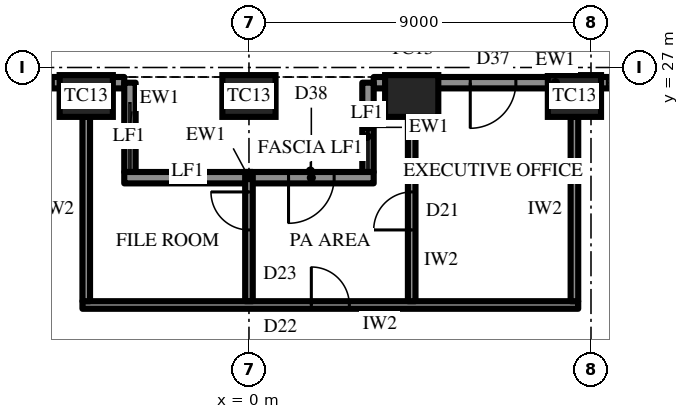
"""IFC4 building model, lengths in metres.
Left out: names, types, materials, properties, quantities, classifications, styles, units other than length and angle.
Written with IfcOpenShell. Run it as: python <this file> out.ifc"""

import sys

from ifc_helpers import new_model, si_unit, direction, frame, frame_2d, origin, origin_2d, place, context, subcontext, project, spatial, rectangle, extrude, element, fill, save


model = new_model("IFC4")
c1 = context("Model", 3, precision=1e-05, world=origin(), true_north=direction((0.0, 1.0)))
c2 = subcontext(c1, "Body", "Model", "MODEL_VIEW")
j1 = project(units=[si_unit("LENGTHUNIT", "METRE"), si_unit("PLANEANGLEUNIT", "RADIAN")], contexts=[c1])
p1 = place(None, origin())
s1 = spatial("IfcSite", under=j1, at=p1, CompositionType="ELEMENT")
p2 = place(p1, origin())
s2 = spatial("IfcBuilding", under=s1, at=p2, CompositionType="ELEMENT")
p3 = place(p2, frame((0.0, 0.0, 328.3)))
s3 = spatial("IfcBuildingStorey", under=s2, at=p3, CompositionType="ELEMENT", Elevation=328.3)
for number, where, z_axis, x_axis in (
    (1, (8.564, 26.25, 0.0), (0.0, 0.0, 1.0), (-1.0, 0.0, 0.0)),
    (2, (4.282, 26.25, 0.0), (0.0, 0.0, 1.0), (-1.0, 0.0, 0.0)),
    (3, (0.0, 26.25, 0.0), (0.0, 0.0, 1.0), (-1.0, 0.0, 0.0)),
    (4, (-4.282, 26.25, 0.0), (0.0, 0.0, 1.0), (-1.0, 0.0, 0.0)),
):
    element("IfcColumn", number, at=place(p3, frame(where, z_axis=z_axis, x_axis=x_axis)), inside=s3, PredefinedType="COLUMN", context=c2, shape_type="SweptSolid", body=[
        extrude(rectangle(XDim=1.4, YDim=1.1, at=origin_2d()), origin(), (0.0, 0.0, 1.0), 4.2),
    ])
p4 = place(p3, frame((12.846, 26.6, 0.0), z_axis=(0.0, 0.0, 1.0), x_axis=(-1.0, 0.0, 0.0)))
e5 = element("IfcWall", 5, at=p4, inside=s3, PredefinedType="SOLIDWALL", context=c2, shape_type="SweptSolid", body=[
    extrude(rectangle(XDim=9.564, YDim=0.3, at=frame_2d((4.782, 0.0))), origin(), (0.0, 0.0, 1.0), 2.9),
])
p5 = place(p4, frame((0.866, 0.0, 0.6)))
e6 = element("IfcOpeningElement", 6, at=p5, cuts=e5, PredefinedType="OPENING", context=c2, shape_type="SweptSolid", body=[
    extrude(rectangle(XDim=2.55, YDim=2.05, at=frame_2d((1.275, 1.025))), frame((0.0, 0.16, 0.0), z_axis=(0.0, -1.0, 0.0), x_axis=(1.0, 0.0, 0.0)), (0.0, 0.0, 1.0), 0.32),
])
p6 = place(p4, frame((5.823, 0.0, 0.0)))
e7 = element("IfcOpeningElement", 7, at=p6, cuts=e5, PredefinedType="OPENING", context=c2, shape_type="SweptSolid", body=[
    extrude(rectangle(XDim=1.2, YDim=2.4, at=frame_2d((0.6, 1.2))), frame((0.0, 0.16, 0.0), z_axis=(0.0, -1.0, 0.0), x_axis=(1.0, 0.0, 0.0)), (0.0, 0.0, 1.0), 0.32),
])
p7 = place(p3, frame((-3.282, 26.6, 0.0), z_axis=(0.0, 0.0, 1.0), x_axis=(-1.0, 0.0, 0.0)))
e8 = element("IfcWall", 8, at=p7, inside=s3, PredefinedType="SOLIDWALL", context=c2, shape_type="SweptSolid", body=[
    extrude(rectangle(XDim=9.564, YDim=0.3, at=frame_2d((4.782, 0.0))), origin(), (0.0, 0.0, 1.0), 2.9),
])
p8 = place(p7, frame((1.866, 0.0, 0.6)))
e9 = element("IfcOpeningElement", 9, at=p8, cuts=e8, PredefinedType="OPENING", context=c2, shape_type="SweptSolid", body=[
    extrude(rectangle(XDim=2.55, YDim=2.05, at=frame_2d((1.275, 1.025))), frame((0.0, 0.16, 0.0), z_axis=(0.0, -1.0, 0.0), x_axis=(1.0, 0.0, 0.0)), (0.0, 0.0, 1.0), 0.32),
])
p9 = place(p7, frame((6.148, 0.0, 0.6)))
e10 = element("IfcOpeningElement", 10, at=p9, cuts=e8, PredefinedType="OPENING", context=c2, shape_type="SweptSolid", body=[
    extrude(rectangle(XDim=2.55, YDim=2.05, at=frame_2d((1.275, 1.025))), frame((0.0, 0.16, 0.0), z_axis=(0.0, -1.0, 0.0), x_axis=(1.0, 0.0, 0.0)), (0.0, 0.0, 1.0), 0.32),
])
for number, where, z_axis, x_axis in (
    (11, (3.132, 26.6, 0.0), (0.0, 0.0, 1.0), (0.0, -1.0, 0.0)),
    (12, (-3.132, 26.6, 0.0), (0.0, 0.0, 1.0), (0.0, -1.0, 0.0)),
):
    element("IfcWall", number, at=place(p3, frame(where, z_axis=z_axis, x_axis=x_axis)), inside=s3, PredefinedType="SOLIDWALL", context=c2, shape_type="SweptSolid", body=[
        extrude(rectangle(XDim=2.35, YDim=0.3, at=frame_2d((1.175, 0.0))), origin(), (0.0, 0.0, 1.0), 2.9),
    ])
p10 = place(p3, frame((3.282, 24.1, 0.0), z_axis=(0.0, 0.0, 1.0), x_axis=(-1.0, 0.0, 0.0)))
e13 = element("IfcWall", 13, at=p10, inside=s3, PredefinedType="SOLIDWALL", context=c2, shape_type="SweptSolid", body=[
    extrude(rectangle(XDim=6.564, YDim=0.3, at=frame_2d((3.282, 0.0))), origin(), (0.0, 0.0, 1.0), 2.9),
])
p11 = place(p10, frame((1.041, 0.0, 0.0)))
e14 = element("IfcOpeningElement", 14, at=p11, cuts=e13, PredefinedType="OPENING", context=c2, shape_type="SweptSolid", body=[
    extrude(rectangle(XDim=1.2, YDim=2.4, at=frame_2d((0.6, 1.2))), frame((0.0, 0.16, 0.0), z_axis=(0.0, -1.0, 0.0), x_axis=(1.0, 0.0, 0.0)), (0.0, 0.0, 1.0), 0.32),
])
p12 = place(p3, frame((8.664, 20.75, 0.0), z_axis=(0.0, 0.0, 1.0), x_axis=(-1.0, 0.0, 0.0)))
e15 = element("IfcWall", 15, at=p12, inside=s3, PredefinedType="PARTITIONING", context=c2, shape_type="SweptSolid", body=[
    extrude(rectangle(XDim=13.046, YDim=0.2, at=frame_2d((6.523, 0.0))), origin(), (0.0, 0.0, 1.0), 4.0),
])
p13 = place(p12, frame((6.023, 0.0, 0.0)))
e16 = element("IfcOpeningElement", 16, at=p13, cuts=e15, PredefinedType="OPENING", context=c2, shape_type="SweptSolid", body=[
    extrude(rectangle(XDim=1.0, YDim=2.2, at=frame_2d((0.5, 1.1))), frame((0.0, 0.11, 0.0), z_axis=(0.0, -1.0, 0.0), x_axis=(1.0, 0.0, 0.0)), (0.0, 0.0, 1.0), 0.22),
])
p14 = place(p3, frame((8.564, 20.85, 0.0), z_axis=(0.0, 0.0, 1.0), x_axis=(0.0, 1.0, 0.0)))
e17 = element("IfcWall", 17, at=p14, inside=s3, PredefinedType="PARTITIONING", context=c2, shape_type="SweptSolid", body=[
    extrude(rectangle(XDim=4.85, YDim=0.2, at=frame_2d((2.425, 0.0))), origin(), (0.0, 0.0, 1.0), 2.992),
])
p15 = place(p3, frame((4.282, 20.85, 0.0), z_axis=(0.0, 0.0, 1.0), x_axis=(0.0, 1.0, 0.0)))
e18 = element("IfcWall", 18, at=p15, inside=s3, PredefinedType="PARTITIONING", context=c2, shape_type="SweptSolid", body=[
    extrude(rectangle(XDim=4.85, YDim=0.2, at=frame_2d((2.425, 0.0))), origin(), (0.0, 0.0, 1.0), 2.992),
])
p16 = place(p15, frame((1.875, 0.0, 0.0)))
e19 = element("IfcOpeningElement", 19, at=p16, cuts=e18, PredefinedType="OPENING", context=c2, shape_type="SweptSolid", body=[
    extrude(rectangle(XDim=1.0, YDim=2.2, at=frame_2d((0.5, 1.1))), frame((0.0, 0.11, 0.0), z_axis=(0.0, -1.0, 0.0), x_axis=(1.0, 0.0, 0.0)), (0.0, 0.0, 1.0), 0.22),
])
p17 = place(p3, frame((0.0, 20.85, 0.0), z_axis=(0.0, 0.0, 1.0), x_axis=(0.0, 1.0, 0.0)))
e20 = element("IfcWall", 20, at=p17, inside=s3, PredefinedType="PARTITIONING", context=c2, shape_type="SweptSolid", body=[
    extrude(rectangle(XDim=3.401, YDim=0.2, at=frame_2d((1.7, 0.0))), origin(), (0.0, 0.0, 1.0), 2.992),
])
p18 = place(p17, frame((1.875, 0.0, 0.0)))
e21 = element("IfcOpeningElement", 21, at=p18, cuts=e20, PredefinedType="OPENING", context=c2, shape_type="SweptSolid", body=[
    extrude(rectangle(XDim=1.0, YDim=2.2, at=frame_2d((0.5, 1.1))), frame((0.0, 0.11, 0.0), z_axis=(0.0, -1.0, 0.0), x_axis=(1.0, 0.0, 0.0)), (0.0, 0.0, 1.0), 0.22),
])
p19 = place(p3, frame((-4.282, 20.85, 0.0), z_axis=(0.0, 0.0, 1.0), x_axis=(0.0, 1.0, 0.0)))
e22 = element("IfcWall", 22, at=p19, inside=s3, PredefinedType="PARTITIONING", context=c2, shape_type="SweptSolid", body=[
    extrude(rectangle(XDim=4.85, YDim=0.2, at=frame_2d((2.425, 0.0))), origin(), (0.0, 0.0, 1.0), 2.992),
])
p20 = place(p5, origin())
e23 = element("IfcWindow", 23, at=p20, inside=s3, PartitioningType="SINGLE_PANEL", PredefinedType="WINDOW", context=c2, shape_type="SweptSolid", body=[
    extrude(rectangle(XDim=2.55, YDim=2.05, at=frame_2d((1.275, 1.025))), frame((0.0, 0.03, 0.0), z_axis=(0.0, -1.0, 0.0), x_axis=(1.0, 0.0, 0.0)), (0.0, 0.0, 1.0), 0.06),
])
fill(e6, e23)
p21 = place(p6, origin())
e24 = element("IfcDoor", 24, at=p21, inside=s3, OperationType="SINGLE_SWING_LEFT", PredefinedType="DOOR", context=c2, shape_type="SweptSolid", body=[
    extrude(rectangle(XDim=1.2, YDim=2.4, at=frame_2d((0.6, 1.2))), frame((0.0, 0.025, 0.0), z_axis=(0.0, -1.0, 0.0), x_axis=(1.0, 0.0, 0.0)), (0.0, 0.0, 1.0), 0.05),
])
fill(e7, e24)
p22 = place(p8, origin())
e25 = element("IfcWindow", 25, at=p22, inside=s3, PartitioningType="SINGLE_PANEL", PredefinedType="WINDOW", context=c2, shape_type="SweptSolid", body=[
    extrude(rectangle(XDim=2.55, YDim=2.05, at=frame_2d((1.275, 1.025))), frame((0.0, 0.03, 0.0), z_axis=(0.0, -1.0, 0.0), x_axis=(1.0, 0.0, 0.0)), (0.0, 0.0, 1.0), 0.06),
])
fill(e9, e25)
p23 = place(p11, origin())
e26 = element("IfcDoor", 26, at=p23, inside=s3, OperationType="SINGLE_SWING_LEFT", PredefinedType="DOOR", context=c2, shape_type="SweptSolid", body=[
    extrude(rectangle(XDim=1.2, YDim=2.4, at=frame_2d((0.6, 1.2))), frame((0.0, 0.025, 0.0), z_axis=(0.0, -1.0, 0.0), x_axis=(1.0, 0.0, 0.0)), (0.0, 0.0, 1.0), 0.05),
])
fill(e14, e26)
p24 = place(p16, origin())
e27 = element("IfcDoor", 27, at=p24, inside=s3, OperationType="SINGLE_SWING_RIGHT", PredefinedType="DOOR", context=c2, shape_type="SweptSolid", body=[
    extrude(rectangle(XDim=1.0, YDim=2.2, at=frame_2d((0.5, 1.1))), frame((0.0, 0.025, 0.0), z_axis=(0.0, -1.0, 0.0), x_axis=(1.0, 0.0, 0.0)), (0.0, 0.0, 1.0), 0.05),
])
fill(e19, e27)
p25 = place(p13, frame((1.0, 0.0, 0.0), z_axis=(0.0, 0.0, 1.0), x_axis=(-1.0, 0.0, 0.0)))
e28 = element("IfcDoor", 28, at=p25, inside=s3, OperationType="SINGLE_SWING_RIGHT", PredefinedType="DOOR", context=c2, shape_type="SweptSolid", body=[
    extrude(rectangle(XDim=1.0, YDim=2.2, at=frame_2d((0.5, 1.1))), frame((0.0, 0.025, 0.0), z_axis=(0.0, -1.0, 0.0), x_axis=(1.0, 0.0, 0.0)), (0.0, 0.0, 1.0), 0.05),
])
fill(e16, e28)
p26 = place(p18, origin())
e29 = element("IfcDoor", 29, at=p26, inside=s3, OperationType="SINGLE_SWING_LEFT", PredefinedType="DOOR", context=c2, shape_type="SweptSolid", body=[
    extrude(rectangle(XDim=1.0, YDim=2.2, at=frame_2d((0.5, 1.1))), frame((0.0, 0.025, 0.0), z_axis=(0.0, -1.0, 0.0), x_axis=(1.0, 0.0, 0.0)), (0.0, 0.0, 1.0), 0.05),
])
fill(e21, e29)
save(model, sys.argv[1])
